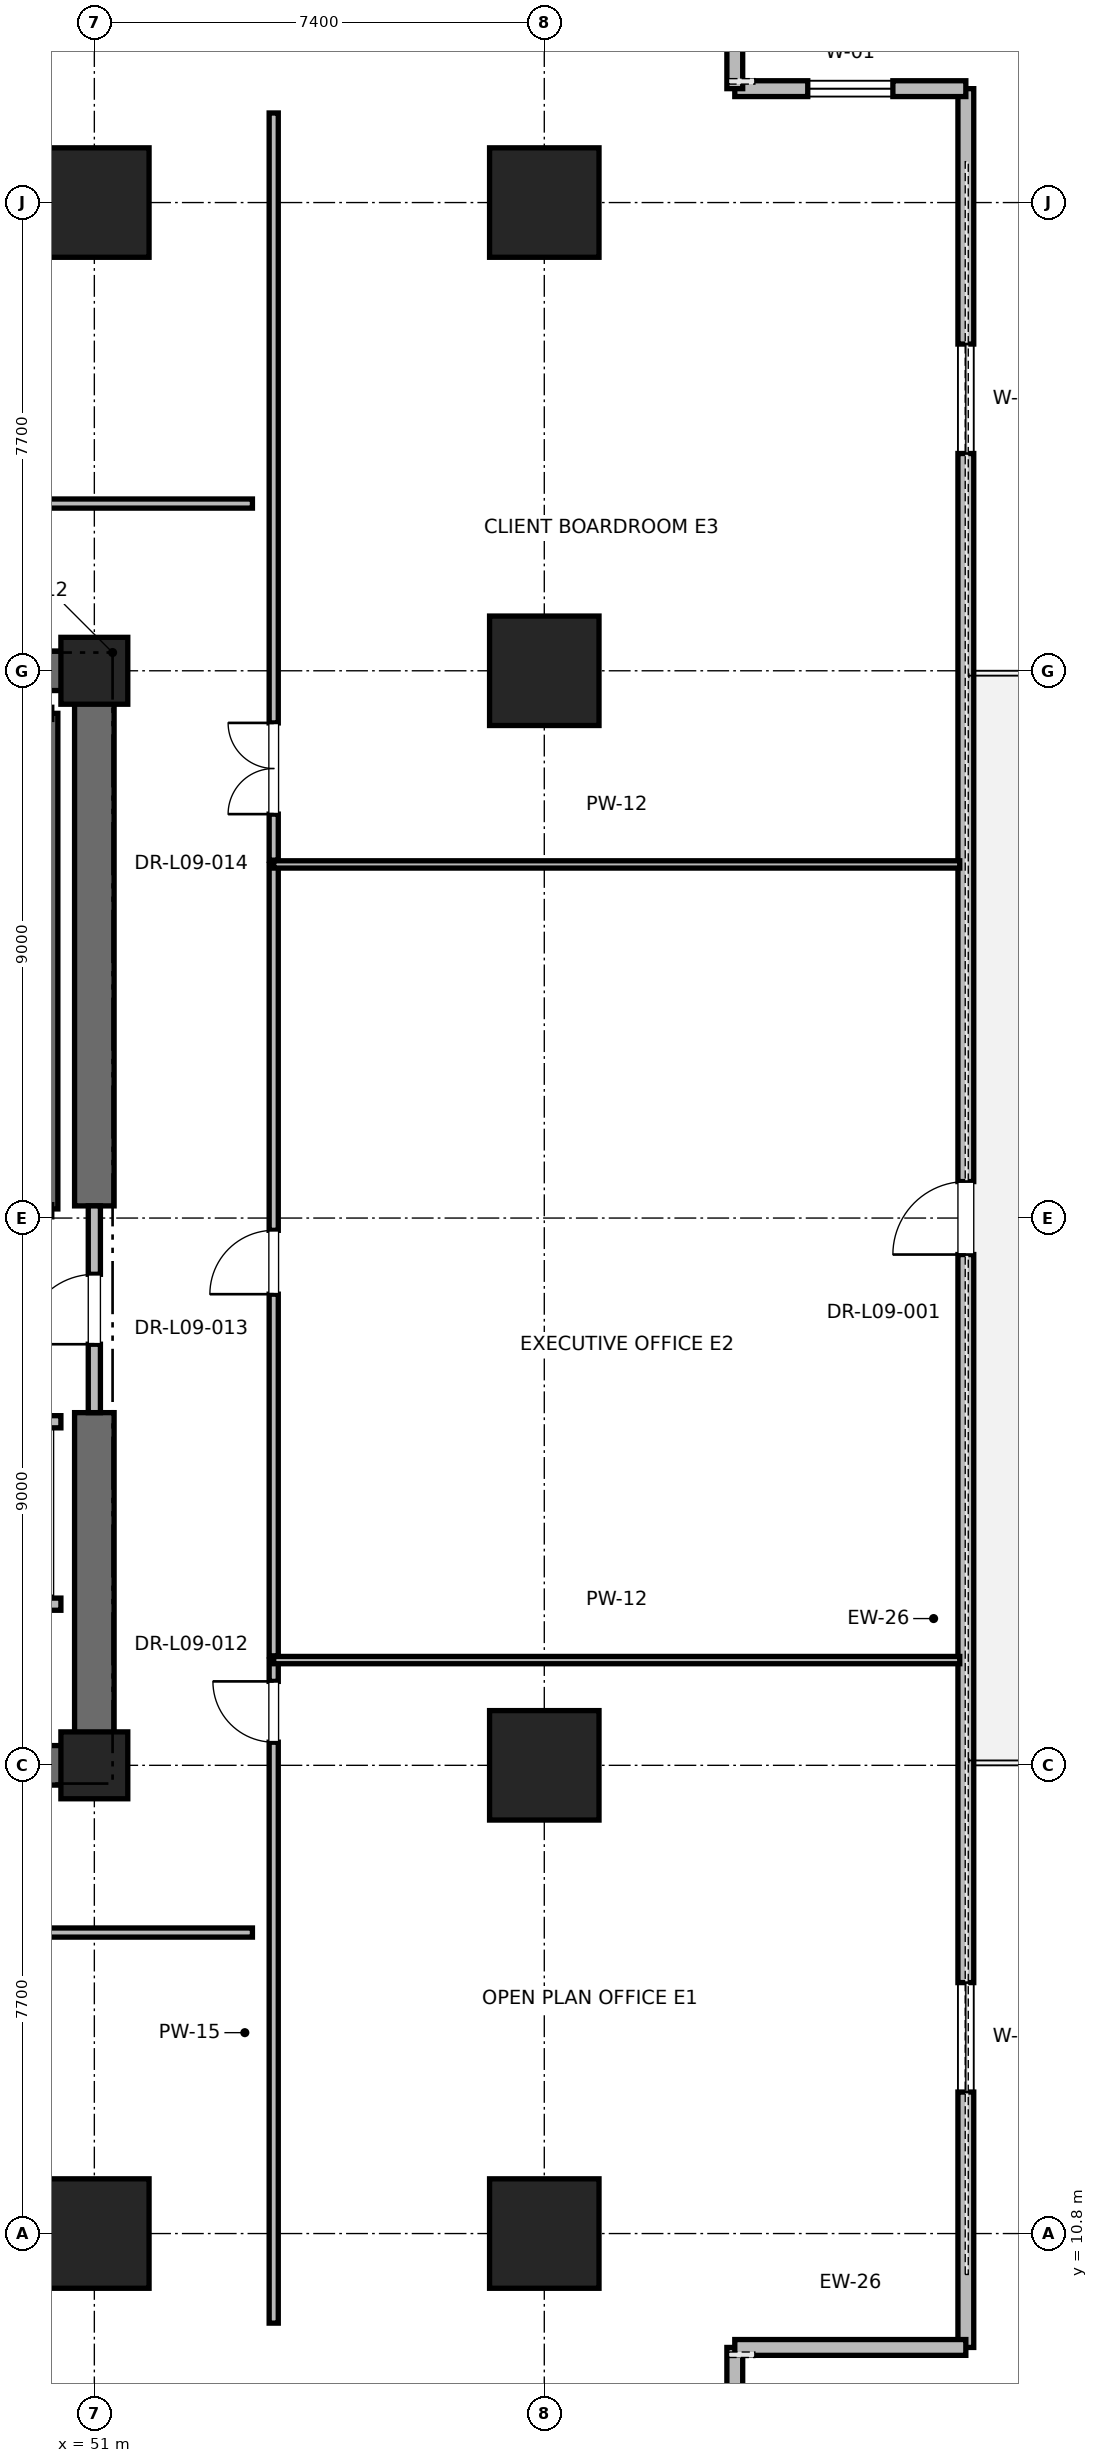
"""IFC4 building model, lengths in metres.
Left out: names, types, materials, properties, quantities, classifications, styles, units other than length and angle.
Written with IfcOpenShell. Run it as: python <this file> out.ifc"""

import sys

from ifc_helpers import new_model, si_unit, direction, frame, frame_2d, origin, origin_2d, place, context, subcontext, project, spatial, rectangle, extrude, element, fill, save


model = new_model("IFC4")
c1 = context("Model", 3, precision=1e-05, world=origin(), true_north=direction((0.0, 1.0)))
c2 = subcontext(c1, "Body", "Model", "MODEL_VIEW")
j1 = project(units=[si_unit("LENGTHUNIT", "METRE"), si_unit("PLANEANGLEUNIT", "RADIAN")], contexts=[c1])
p1 = place(None, origin())
s1 = spatial("IfcSite", under=j1, at=p1, CompositionType="ELEMENT")
p2 = place(p1, origin())
s2 = spatial("IfcBuilding", under=s1, at=p2, CompositionType="ELEMENT")
p3 = place(p2, frame((0.0, 0.0, 43.6)))
s3 = spatial("IfcBuildingStorey", under=s2, at=p3, CompositionType="ELEMENT", Elevation=43.6)
for number, where, z_axis, x_axis in (
    (1, (51.0, 10.8, 0.0), (0.0, 0.0, 1.0), (1.0, 0.0, 0.0)),
    (2, (51.0, 44.2, 0.0), (0.0, 0.0, 1.0), (1.0, 0.0, 0.0)),
    (3, (58.4, 18.5, 0.0), (0.0, 0.0, 1.0), (1.0, 0.0, 0.0)),
    (4, (58.4, 36.5, 0.0), (0.0, 0.0, 1.0), (1.0, 0.0, 0.0)),
    (5, (58.4, 10.8, 0.0), (0.0, 0.0, 1.0), (1.0, 0.0, 0.0)),
    (6, (58.4, 44.2, 0.0), (0.0, 0.0, 1.0), (1.0, 0.0, 0.0)),
):
    element("IfcColumn", number, at=place(p3, frame(where, z_axis=z_axis, x_axis=x_axis)), inside=s3, PredefinedType="COLUMN", context=c2, shape_type="SweptSolid", body=[
        extrude(rectangle(XDim=1.8, YDim=1.8, at=origin_2d()), origin(), (0.0, 0.0, 1.0), 4.0),
    ])
for number, where, z_axis, x_axis in (
    (7, (51.0, 18.5, 0.0), (0.0, 0.0, 1.0), (1.0, 0.0, 0.0)),
    (8, (51.0, 36.5, 0.0), (0.0, 0.0, 1.0), (1.0, 0.0, 0.0)),
):
    element("IfcColumn", number, at=place(p3, frame(where, z_axis=z_axis, x_axis=x_axis)), inside=s3, PredefinedType="PILASTER", context=c2, shape_type="SweptSolid", body=[
        extrude(rectangle(XDim=1.1, YDim=1.1, at=origin_2d()), origin(), (0.0, 0.0, 1.0), 4.0),
    ])
p4 = place(p3, frame((41.8, 18.5, 0.0), z_axis=(0.0, 0.0, 1.0), x_axis=(1.0, 0.0, 0.0)))
e9 = element("IfcWall", 9, at=p4, inside=s3, PredefinedType="SHEAR", context=c2, shape_type="SweptSolid", body=[
    extrude(rectangle(XDim=9.2, YDim=0.65, at=frame_2d((4.6, 0.0))), origin(), (0.0, 0.0, 1.0), 3.76),
])
for number, where, z_axis, x_axis in (
    (10, (45.2, 36.5, 0.0), (0.0, 0.0, 1.0), (1.0, 0.0, 0.0)),
    (11, (51.0, 18.5, 0.0), (0.0, 0.0, 1.0), (0.0, 1.0, 0.0)),
):
    element("IfcWall", number, at=place(p3, frame(where, z_axis=z_axis, x_axis=x_axis)), inside=s3, PredefinedType="SHEAR", context=c2, shape_type="SweptSolid", body=[
        extrude(rectangle(XDim=5.8, YDim=0.65, at=frame_2d((2.9, 0.0))), origin(), (0.0, 0.0, 1.0), 3.76),
    ])
p5 = place(p3, frame((51.0, 27.7, 0.0), z_axis=(0.0, 0.0, 1.0), x_axis=(0.0, 1.0, 0.0)))
e12 = element("IfcWall", 12, at=p5, inside=s3, PredefinedType="SHEAR", context=c2, shape_type="SweptSolid", body=[
    extrude(rectangle(XDim=8.8, YDim=0.65, at=frame_2d((4.4, 0.0))), origin(), (0.0, 0.0, 1.0), 3.76),
])
p6 = place(p3, frame((65.333, 8.927, 0.0), z_axis=(0.0, 0.0, 1.0), x_axis=(0.0, 1.0, 0.0)))
e13 = element("IfcWall", 13, at=p6, inside=s3, PredefinedType="PARAPET", context=c2, shape_type="SweptSolid", body=[
    extrude(rectangle(XDim=37.146, YDim=0.26, at=frame_2d((18.573, 0.0))), origin(), (0.0, 0.0, 1.0), 2.889),
])
p7 = place(p6, frame((4.2, 0.0, 0.85)))
e14 = element("IfcOpeningElement", 14, at=p7, cuts=e13, PredefinedType="OPENING", context=c2, shape_type="SweptSolid", body=[
    extrude(rectangle(XDim=1.8, YDim=2.2, at=frame_2d((0.9, 1.1))), frame((0.0, 0.13, 0.0), z_axis=(0.0, -1.0, 0.0), x_axis=(1.0, 0.0, 0.0)), (0.0, 0.0, 1.0), 0.26),
])
p8 = place(p6, frame((17.973, 0.0, 0.0)))
e15 = element("IfcOpeningElement", 15, at=p8, cuts=e13, PredefinedType="OPENING", context=c2, shape_type="SweptSolid", body=[
    extrude(rectangle(XDim=1.2, YDim=2.2, at=frame_2d((0.6, 1.1))), frame((0.0, 0.13, 0.0), z_axis=(0.0, -1.0, 0.0), x_axis=(1.0, 0.0, 0.0)), (0.0, 0.0, 1.0), 0.26),
])
p9 = place(p6, frame((31.146, 0.0, 0.85)))
e16 = element("IfcOpeningElement", 16, at=p9, cuts=e13, PredefinedType="OPENING", context=c2, shape_type="SweptSolid", body=[
    extrude(rectangle(XDim=1.8, YDim=2.2, at=frame_2d((0.9, 1.1))), frame((0.0, 0.13, 0.0), z_axis=(0.0, -1.0, 0.0), x_axis=(1.0, 0.0, 0.0)), (0.0, 0.0, 1.0), 0.26),
])
p10 = place(p3, frame((61.533, 5.527, 0.0), z_axis=(0.0, 0.0, 1.0), x_axis=(0.0, 1.0, 0.0)))
e17 = element("IfcWall", 17, at=p10, inside=s3, PredefinedType="PARAPET", context=c2, shape_type="SweptSolid", body=[
    extrude(rectangle(XDim=3.4, YDim=0.26, at=frame_2d((1.7, 0.0))), origin(), (0.0, 0.0, 1.0), 3.76),
])
p11 = place(p10, frame((1.0, 0.0, 0.85)))
e18 = element("IfcOpeningElement", 18, at=p11, cuts=e17, PredefinedType="OPENING", context=c2, shape_type="SweptSolid", body=[
    extrude(rectangle(XDim=1.4, YDim=2.0, at=frame_2d((0.7, 1.0))), frame((0.0, 0.13, 0.0), z_axis=(0.0, -1.0, 0.0), x_axis=(1.0, 0.0, 0.0)), (0.0, 0.0, 1.0), 0.26),
])
p12 = place(p3, frame((61.533, 8.927, 0.0), z_axis=(0.0, 0.0, 1.0), x_axis=(1.0, 0.0, 0.0)))
e19 = element("IfcWall", 19, at=p12, inside=s3, PredefinedType="PARAPET", context=c2, shape_type="SweptSolid", body=[
    extrude(rectangle(XDim=3.8, YDim=0.26, at=frame_2d((1.9, 0.0))), origin(), (0.0, 0.0, 1.0), 3.76),
])
p13 = place(p3, frame((65.333, 46.073, 0.0), z_axis=(0.0, 0.0, 1.0), x_axis=(-1.0, 0.0, 0.0)))
e20 = element("IfcWall", 20, at=p13, inside=s3, PredefinedType="PARAPET", context=c2, shape_type="SweptSolid", body=[
    extrude(rectangle(XDim=3.8, YDim=0.26, at=frame_2d((1.9, 0.0))), origin(), (0.0, 0.0, 1.0), 3.76),
])
p14 = place(p13, frame((1.2, 0.0, 0.85)))
e21 = element("IfcOpeningElement", 21, at=p14, cuts=e20, PredefinedType="OPENING", context=c2, shape_type="SweptSolid", body=[
    extrude(rectangle(XDim=1.4, YDim=2.0, at=frame_2d((0.7, 1.0))), frame((0.0, 0.13, 0.0), z_axis=(0.0, -1.0, 0.0), x_axis=(1.0, 0.0, 0.0)), (0.0, 0.0, 1.0), 0.26),
])
p15 = place(p3, frame((61.533, 46.073, 0.0), z_axis=(0.0, 0.0, 1.0), x_axis=(0.0, 1.0, 0.0)))
e22 = element("IfcWall", 22, at=p15, inside=s3, PredefinedType="PARAPET", context=c2, shape_type="SweptSolid", body=[
    extrude(rectangle(XDim=3.4, YDim=0.26, at=frame_2d((1.7, 0.0))), origin(), (0.0, 0.0, 1.0), 3.76),
])
p16 = place(p3, frame((50.3, 27.65, 0.0), z_axis=(0.0, 0.0, 1.0), x_axis=(0.0, 1.0, 0.0)))
e23 = element("IfcWall", 23, at=p16, inside=s3, PredefinedType="SOLIDWALL", context=c2, shape_type="SweptSolid", body=[
    extrude(rectangle(XDim=8.15, YDim=0.2, at=frame_2d((4.075, 0.0))), origin(), (0.0, 0.0, 1.0), 3.76),
])
p17 = place(p3, frame((51.0, 24.3, 0.0), z_axis=(0.0, 0.0, 1.0), x_axis=(0.0, 1.0, 0.0)))
e24 = element("IfcWall", 24, at=p17, inside=s3, PredefinedType="PARTITIONING", context=c2, shape_type="SweptSolid", body=[
    extrude(rectangle(XDim=3.4, YDim=0.2, at=frame_2d((1.7, 0.0))), origin(), (0.0, 0.0, 1.0), 2.54),
])
p18 = place(p17, frame((1.125, 0.0, 0.0)))
e25 = element("IfcOpeningElement", 25, at=p18, cuts=e24, PredefinedType="OPENING", context=c2, shape_type="SweptSolid", body=[
    extrude(rectangle(XDim=1.15, YDim=2.2, at=frame_2d((0.575, 1.1))), frame((0.0, 0.1, 0.0), z_axis=(0.0, -1.0, 0.0), x_axis=(1.0, 0.0, 0.0)), (0.0, 0.0, 1.0), 0.2),
])
p19 = place(p3, frame((47.85, 21.15, 0.0), z_axis=(0.0, 0.0, 1.0), x_axis=(1.0, 0.0, 0.0)))
e26 = element("IfcWall", 26, at=p19, inside=s3, PredefinedType="SOLIDWALL", context=c2, shape_type="SweptSolid", body=[
    extrude(rectangle(XDim=2.6, YDim=0.2, at=frame_2d((1.3, 0.0))), origin(), (0.0, 0.0, 1.0), 3.76),
])
p20 = place(p3, frame((50.45, 24.15, 0.0), z_axis=(0.0, 0.0, 1.0), x_axis=(-1.0, 0.0, 0.0)))
e27 = element("IfcWall", 27, at=p20, inside=s3, PredefinedType="SOLIDWALL", context=c2, shape_type="SweptSolid", body=[
    extrude(rectangle(XDim=2.6, YDim=0.2, at=frame_2d((1.3, 0.0))), origin(), (0.0, 0.0, 1.0), 2.54),
])
p21 = place(p20, frame((0.75, 0.0, 0.0)))
e28 = element("IfcOpeningElement", 28, at=p21, cuts=e27, PredefinedType="OPENING", context=c2, shape_type="SweptSolid", body=[
    extrude(rectangle(XDim=1.1, YDim=2.2, at=frame_2d((0.55, 1.1))), frame((0.0, 0.1, 0.0), z_axis=(0.0, -1.0, 0.0), x_axis=(1.0, 0.0, 0.0)), (0.0, 0.0, 1.0), 0.2),
])
p22 = place(p3, frame((43.878, 39.25, 0.0), z_axis=(0.0, 0.0, 1.0), x_axis=(1.0, 0.0, 0.0)))
e29 = element("IfcWall", 29, at=p22, inside=s3, PredefinedType="PARTITIONING", context=c2, shape_type="SweptSolid", body=[
    extrude(rectangle(XDim=9.722, YDim=0.15, at=frame_2d((4.861, 0.0))), origin(), (0.0, 0.0, 1.0), 2.85),
])
p23 = place(p22, frame((4.311, 0.0, 0.0)))
e30 = element("IfcOpeningElement", 30, at=p23, cuts=e29, PredefinedType="OPENING", context=c2, shape_type="SweptSolid", body=[
    extrude(rectangle(XDim=1.0, YDim=2.15, at=frame_2d((0.5, 1.075))), frame((0.0, 0.075, 0.0), z_axis=(0.0, -1.0, 0.0), x_axis=(1.0, 0.0, 0.0)), (0.0, 0.0, 1.0), 0.15),
])
p24 = place(p3, frame((38.982, 15.75, 0.0), z_axis=(0.0, 0.0, 1.0), x_axis=(1.0, 0.0, 0.0)))
e31 = element("IfcWall", 31, at=p24, inside=s3, PredefinedType="PARTITIONING", context=c2, shape_type="SweptSolid", body=[
    extrude(rectangle(XDim=14.618, YDim=0.15, at=frame_2d((7.309, 0.0))), origin(), (0.0, 0.0, 1.0), 2.85),
])
p25 = place(p24, frame((6.759, 0.0, 0.0)))
e32 = element("IfcOpeningElement", 32, at=p25, cuts=e31, PredefinedType="OPENING", context=c2, shape_type="SweptSolid", body=[
    extrude(rectangle(XDim=1.0, YDim=2.15, at=frame_2d((0.5, 1.075))), frame((0.0, 0.075, 0.0), z_axis=(0.0, -1.0, 0.0), x_axis=(1.0, 0.0, 0.0)), (0.0, 0.0, 1.0), 0.15),
])
p26 = place(p3, frame((53.95, 9.327, 0.0), z_axis=(0.0, 0.0, 1.0), x_axis=(0.0, 1.0, 0.0)))
e33 = element("IfcWall", 33, at=p26, inside=s3, PredefinedType="PARTITIONING", context=c2, shape_type="SweptSolid", body=[
    extrude(rectangle(XDim=10.904, YDim=0.15, at=frame_2d((5.452, 0.0))), origin(), (0.0, 0.0, 1.0), 2.85),
])
p27 = place(p26, frame((9.553, 0.0, 0.0)))
e34 = element("IfcOpeningElement", 34, at=p27, cuts=e33, PredefinedType="OPENING", context=c2, shape_type="SweptSolid", body=[
    extrude(rectangle(XDim=1.0, YDim=2.15, at=frame_2d((0.5, 1.075))), frame((0.0, 0.075, 0.0), z_axis=(0.0, -1.0, 0.0), x_axis=(1.0, 0.0, 0.0)), (0.0, 0.0, 1.0), 0.15),
])
p28 = place(p3, frame((53.95, 20.231, 0.0), z_axis=(0.0, 0.0, 1.0), x_axis=(1.0, 0.0, 0.0)))
e35 = element("IfcWall", 35, at=p28, inside=s3, PredefinedType="PARTITIONING", context=c2, shape_type="SweptSolid", body=[
    extrude(rectangle(XDim=11.283, YDim=0.12, at=frame_2d((5.642, 0.0))), origin(), (0.0, 0.0, 1.0), 2.85),
])
p29 = place(p3, frame((53.95, 20.301, 0.0), z_axis=(0.0, 0.0, 1.0), x_axis=(0.0, 1.0, 0.0)))
e36 = element("IfcWall", 36, at=p29, inside=s3, PredefinedType="PARTITIONING", context=c2, shape_type="SweptSolid", body=[
    extrude(rectangle(XDim=13.015, YDim=0.15, at=frame_2d((6.507, 0.0))), origin(), (0.0, 0.0, 1.0), 2.85),
])
p30 = place(p29, frame((5.947, 0.0, 0.0)))
e37 = element("IfcOpeningElement", 37, at=p30, cuts=e36, PredefinedType="OPENING", context=c2, shape_type="SweptSolid", body=[
    extrude(rectangle(XDim=1.05, YDim=2.2, at=frame_2d((0.525, 1.1))), frame((0.0, 0.075, 0.0), z_axis=(0.0, -1.0, 0.0), x_axis=(1.0, 0.0, 0.0)), (0.0, 0.0, 1.0), 0.15),
])
p31 = place(p3, frame((53.95, 33.315, 0.0), z_axis=(0.0, 0.0, 1.0), x_axis=(1.0, 0.0, 0.0)))
e38 = element("IfcWall", 38, at=p31, inside=s3, PredefinedType="PARTITIONING", context=c2, shape_type="SweptSolid", body=[
    extrude(rectangle(XDim=11.283, YDim=0.12, at=frame_2d((5.642, 0.0))), origin(), (0.0, 0.0, 1.0), 2.85),
])
p32 = place(p3, frame((53.95, 33.385, 0.0), z_axis=(0.0, 0.0, 1.0), x_axis=(0.0, 1.0, 0.0)))
e39 = element("IfcWall", 39, at=p32, inside=s3, PredefinedType="PARTITIONING", context=c2, shape_type="SweptSolid", body=[
    extrude(rectangle(XDim=12.288, YDim=0.15, at=frame_2d((6.144, 0.0))), origin(), (0.0, 0.0, 1.0), 2.85),
])
p33 = place(p32, frame((0.757, 0.0, 0.0)))
e40 = element("IfcOpeningElement", 40, at=p33, cuts=e39, PredefinedType="OPENING", context=c2, shape_type="SweptSolid", body=[
    extrude(rectangle(XDim=1.5, YDim=2.25, at=frame_2d((0.75, 1.125))), frame((0.0, 0.075, 0.0), z_axis=(0.0, -1.0, 0.0), x_axis=(1.0, 0.0, 0.0)), (0.0, 0.0, 1.0), 0.15),
])
p34 = place(p7, origin())
e41 = element("IfcWindow", 41, at=p34, inside=s3, PartitioningType="SINGLE_PANEL", PredefinedType="WINDOW", context=c2, shape_type="SweptSolid", body=[
    extrude(rectangle(XDim=1.8, YDim=2.2, at=frame_2d((0.9, 1.1))), frame((0.0, 0.03, 0.0), z_axis=(0.0, -1.0, 0.0), x_axis=(1.0, 0.0, 0.0)), (0.0, 0.0, 1.0), 0.06),
])
fill(e14, e41)
p35 = place(p8, origin())
e42 = element("IfcDoor", 42, at=p35, inside=s3, OperationType="SINGLE_SWING_LEFT", PredefinedType="DOOR", context=c2, shape_type="SweptSolid", body=[
    extrude(rectangle(XDim=1.2, YDim=2.2, at=frame_2d((0.6, 1.1))), frame((0.0, 0.025, 0.0), z_axis=(0.0, -1.0, 0.0), x_axis=(1.0, 0.0, 0.0)), (0.0, 0.0, 1.0), 0.05),
])
fill(e15, e42)
p36 = place(p9, origin())
e43 = element("IfcWindow", 43, at=p36, inside=s3, PartitioningType="SINGLE_PANEL", PredefinedType="WINDOW", context=c2, shape_type="SweptSolid", body=[
    extrude(rectangle(XDim=1.8, YDim=2.2, at=frame_2d((0.9, 1.1))), frame((0.0, 0.03, 0.0), z_axis=(0.0, -1.0, 0.0), x_axis=(1.0, 0.0, 0.0)), (0.0, 0.0, 1.0), 0.06),
])
fill(e16, e43)
p37 = place(p14, origin())
e44 = element("IfcWindow", 44, at=p37, inside=s3, PartitioningType="SINGLE_PANEL", PredefinedType="WINDOW", context=c2, shape_type="SweptSolid", body=[
    extrude(rectangle(XDim=1.4, YDim=2.0, at=frame_2d((0.7, 1.0))), frame((0.0, 0.03, 0.0), z_axis=(0.0, -1.0, 0.0), x_axis=(1.0, 0.0, 0.0)), (0.0, 0.0, 1.0), 0.06),
])
fill(e21, e44)
p38 = place(p18, origin())
e45 = element("IfcDoor", 45, at=p38, inside=s3, OperationType="SINGLE_SWING_LEFT", PredefinedType="DOOR", context=c2, shape_type="SweptSolid", body=[
    extrude(rectangle(XDim=1.15, YDim=2.2, at=frame_2d((0.575, 1.1))), frame((0.0, 0.025, 0.0), z_axis=(0.0, -1.0, 0.0), x_axis=(1.0, 0.0, 0.0)), (0.0, 0.0, 1.0), 0.05),
])
fill(e25, e45)
p39 = place(p27, origin())
e46 = element("IfcDoor", 46, at=p39, inside=s3, OperationType="SINGLE_SWING_RIGHT", PredefinedType="DOOR", context=c2, shape_type="SweptSolid", body=[
    extrude(rectangle(XDim=1.0, YDim=2.15, at=frame_2d((0.5, 1.075))), frame((0.0, 0.025, 0.0), z_axis=(0.0, -1.0, 0.0), x_axis=(1.0, 0.0, 0.0)), (0.0, 0.0, 1.0), 0.05),
])
fill(e34, e46)
p40 = place(p30, origin())
e47 = element("IfcDoor", 47, at=p40, inside=s3, OperationType="SINGLE_SWING_LEFT", PredefinedType="DOOR", context=c2, shape_type="SweptSolid", body=[
    extrude(rectangle(XDim=1.05, YDim=2.2, at=frame_2d((0.525, 1.1))), frame((0.0, 0.025, 0.0), z_axis=(0.0, -1.0, 0.0), x_axis=(1.0, 0.0, 0.0)), (0.0, 0.0, 1.0), 0.05),
])
fill(e37, e47)
p41 = place(p33, origin())
e48 = element("IfcDoor", 48, at=p41, inside=s3, OperationType="DOUBLE_DOOR_SINGLE_SWING", PredefinedType="DOOR", context=c2, shape_type="SweptSolid", body=[
    extrude(rectangle(XDim=1.5, YDim=2.25, at=frame_2d((0.75, 1.125))), frame((0.0, 0.025, 0.0), z_axis=(0.0, -1.0, 0.0), x_axis=(1.0, 0.0, 0.0)), (0.0, 0.0, 1.0), 0.05),
])
fill(e40, e48)
save(model, sys.argv[1])
